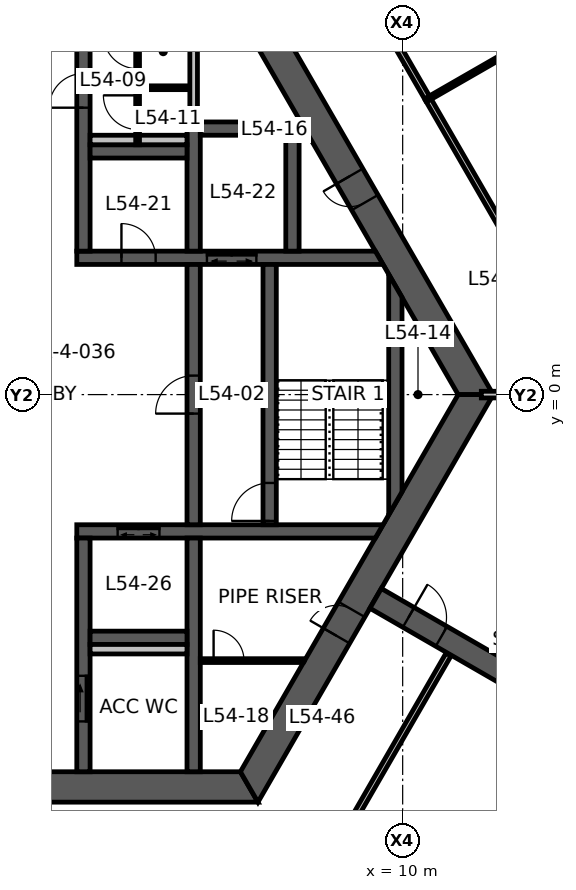
"""IFC4 building model, lengths in metres.
Left out: names, types, materials, properties, quantities, classifications, styles, units other than length and angle.
Written with IfcOpenShell. Run it as: python <this file> out.ifc"""

import sys

from ifc_helpers import new_model, si_unit, direction, frame, frame_2d, origin, place, context, subcontext, project, spatial, polyline, rectangle, outline, extrude, element, fill, save


model = new_model("IFC4")
c1 = context("Model", 3, precision=1e-05, world=origin(), true_north=direction((0.0, 1.0)))
c2 = subcontext(c1, "Body", "Model", "MODEL_VIEW")
j1 = project(units=[si_unit("LENGTHUNIT", "METRE"), si_unit("PLANEANGLEUNIT", "RADIAN")], contexts=[c1])
p1 = place(None, origin())
s1 = spatial("IfcSite", under=j1, at=p1, CompositionType="ELEMENT")
p2 = place(p1, origin())
s2 = spatial("IfcBuilding", under=s1, at=p2, CompositionType="ELEMENT")
p3 = place(p2, frame((0.0, 0.0, 216.7)))
s3 = spatial("IfcBuildingStorey", under=s2, at=p3, CompositionType="ELEMENT", Elevation=216.7)
p4 = place(p3, frame((11.922, 0.0, 0.0), z_axis=(0.0, 0.0, 1.0), x_axis=(-0.500004296715, 0.866022923061, 0.0)))
e1 = element("IfcWall", 1, at=p4, inside=s3, PredefinedType="SHEAR", context=c2, shape_type="SweptSolid", body=[
    extrude(outline(polyline([(-0.231, -0.4), (5.835, -0.4), (6.635, -0.4), (12.153, -0.4), (11.691, 0.4), (6.635, 0.4), (5.835, 0.4), (0.231, 0.4), (-0.231, -0.4)])), origin(), (0.0, 0.0, 1.0), 3.9),
])
p5 = place(p4, frame((5.835, 0.0, 0.0)))
e2 = element("IfcOpeningElement", 2, at=p5, cuts=e1, PredefinedType="OPENING", context=c2, shape_type="SweptSolid", body=[
    extrude(rectangle(XDim=0.8, YDim=2.1, at=frame_2d((0.4, 1.05))), frame((0.0, 0.41, 0.0), z_axis=(0.0, -1.0, 0.0), x_axis=(1.0, 0.0, 0.0)), (0.0, 0.0, 1.0), 0.82),
])
p6 = place(p3, frame((-5.961, -10.325, 0.0), z_axis=(0.0, 0.0, 1.0), x_axis=(1.0, 0.0, 0.0)))
e3 = element("IfcWall", 3, at=p6, inside=s3, PredefinedType="SHEAR", context=c2, shape_type="SweptSolid", body=[
    extrude(outline(polyline([(-0.231, -0.4), (5.461, -0.4), (6.461, -0.4), (12.153, -0.4), (11.691, 0.4), (6.461, 0.4), (5.461, 0.4), (0.231, 0.4), (-0.231, -0.4)])), origin(), (0.0, 0.0, 1.0), 3.9),
])
p7 = place(p6, frame((5.461, 0.0, 0.0)))
e4 = element("IfcOpeningElement", 4, at=p7, cuts=e3, PredefinedType="OPENING", context=c2, shape_type="SweptSolid", body=[
    extrude(rectangle(XDim=1.0, YDim=2.1, at=frame_2d((0.5, 1.05))), frame((0.0, 0.41, 0.0), z_axis=(0.0, -1.0, 0.0), x_axis=(1.0, 0.0, 0.0)), (0.0, 0.0, 1.0), 0.82),
])
p8 = place(p3, frame((5.961, -10.325, 0.0), z_axis=(0.0, 0.0, 1.0), x_axis=(0.500004296715, 0.866022923061, 0.0)))
e5 = element("IfcWall", 5, at=p8, inside=s3, PredefinedType="SHEAR", context=c2, shape_type="SweptSolid", body=[
    extrude(outline(polyline([(-0.231, -0.4), (4.594, -0.4), (5.394, -0.4), (12.153, -0.4), (11.691, 0.4), (5.394, 0.4), (4.594, 0.4), (0.231, 0.4), (-0.231, -0.4)])), origin(), (0.0, 0.0, 1.0), 3.9),
])
p9 = place(p8, frame((4.594, 0.0, 0.0)))
e6 = element("IfcOpeningElement", 6, at=p9, cuts=e5, PredefinedType="OPENING", context=c2, shape_type="SweptSolid", body=[
    extrude(rectangle(XDim=0.8, YDim=2.1, at=frame_2d((0.4, 1.05))), frame((0.0, 0.41, 0.0), z_axis=(0.0, -1.0, 0.0), x_axis=(1.0, 0.0, 0.0)), (0.0, 0.0, 1.0), 0.82),
])
p10 = place(p3, frame((9.288, -5.363, 0.0), z_axis=(0.0, 0.0, 1.0), x_axis=(0.866031736626, -0.499989031036, 0.0)))
e7 = element("IfcWall", 7, at=p10, inside=s3, PredefinedType="SHEAR", context=c2, shape_type="SweptSolid", body=[
    extrude(rectangle(XDim=7.796, YDim=0.6, at=frame_2d((3.898, 0.0))), origin(), (0.0, 0.0, 1.0), 3.9),
])
p11 = place(p10, frame((1.0, 0.0, 0.0)))
e8 = element("IfcOpeningElement", 8, at=p11, cuts=e7, PredefinedType="OPENING", context=c2, shape_type="SweptSolid", body=[
    extrude(rectangle(XDim=1.0, YDim=2.1, at=frame_2d((0.5, 1.05))), frame((0.0, 0.31, 0.0), z_axis=(0.0, -1.0, 0.0), x_axis=(1.0, 0.0, 0.0)), (0.0, 0.0, 1.0), 0.62),
])
p12 = place(p3, frame((1.425, 3.6, 0.0), z_axis=(0.0, 0.0, 1.0), x_axis=(1.0, 0.0, 0.0)))
e9 = element("IfcWall", 9, at=p12, inside=s3, PredefinedType="SHEAR", context=c2, shape_type="SweptSolid", body=[
    extrude(outline(polyline([(0.0, -0.175), (1.175, -0.175), (2.075, -0.175), (3.425, -0.175), (4.725, -0.175), (8.058, -0.175), (7.856, 0.175), (4.725, 0.175), (3.425, 0.175), (2.075, 0.175), (1.175, 0.175), (0.0, 0.175), (0.0, -0.175)])), origin(), (0.0, 0.0, 1.0), 3.9),
])
p13 = place(p12, frame((1.175, 0.0, 0.0)))
e10 = element("IfcOpeningElement", 10, at=p13, cuts=e9, PredefinedType="OPENING", context=c2, shape_type="SweptSolid", body=[
    extrude(rectangle(XDim=0.9, YDim=2.1, at=frame_2d((0.45, 1.05))), frame((0.0, 0.185, 0.0), z_axis=(0.0, -1.0, 0.0), x_axis=(1.0, 0.0, 0.0)), (0.0, 0.0, 1.0), 0.37),
])
p14 = place(p12, frame((3.425, 0.0, 0.0)))
e11 = element("IfcOpeningElement", 11, at=p14, cuts=e9, PredefinedType="OPENING", context=c2, shape_type="SweptSolid", body=[
    extrude(rectangle(XDim=1.3, YDim=2.1, at=frame_2d((0.65, 1.05))), frame((0.0, 0.185, 0.0), z_axis=(0.0, -1.0, 0.0), x_axis=(1.0, 0.0, 0.0)), (0.0, 0.0, 1.0), 0.37),
])
p15 = place(p3, frame((1.425, -3.6, 0.0), z_axis=(0.0, 0.0, 1.0), x_axis=(1.0, 0.0, 0.0)))
e12 = element("IfcWall", 12, at=p15, inside=s3, PredefinedType="SHEAR", context=c2, shape_type="SweptSolid", body=[
    extrude(outline(polyline([(0.0, -0.175), (1.075, -0.175), (2.175, -0.175), (7.856, -0.175), (8.058, 0.175), (2.175, 0.175), (1.075, 0.175), (0.0, 0.175), (0.0, -0.175)])), origin(), (0.0, 0.0, 1.0), 3.9),
])
p16 = place(p15, frame((1.075, 0.0, 0.0)))
e13 = element("IfcOpeningElement", 13, at=p16, cuts=e12, PredefinedType="OPENING", context=c2, shape_type="SweptSolid", body=[
    extrude(rectangle(XDim=1.1, YDim=2.1, at=frame_2d((0.55, 1.05))), frame((0.0, 0.185, 0.0), z_axis=(0.0, -1.0, 0.0), x_axis=(1.0, 0.0, 0.0)), (0.0, 0.0, 1.0), 0.37),
])
p17 = place(p3, frame((1.6, 3.775, 0.0), z_axis=(0.0, 0.0, 1.0), x_axis=(0.0, 1.0, 0.0)))
e14 = element("IfcWall", 14, at=p17, inside=s3, PredefinedType="SHEAR", context=c2, shape_type="SweptSolid", body=[
    extrude(rectangle(XDim=6.15, YDim=0.35, at=frame_2d((3.075, 0.0))), origin(), (0.0, 0.0, 1.0), 3.9),
])
p18 = place(p17, frame((3.775, 0.0, 0.0)))
e15 = element("IfcOpeningElement", 15, at=p18, cuts=e14, PredefinedType="OPENING", context=c2, shape_type="SweptSolid", body=[
    extrude(rectangle(XDim=0.9, YDim=2.1, at=frame_2d((0.45, 1.05))), frame((0.0, 0.185, 0.0), z_axis=(0.0, -1.0, 0.0), x_axis=(1.0, 0.0, 0.0)), (0.0, 0.0, 1.0), 0.37),
])
p19 = place(p3, frame((1.6, -3.775, 0.0), z_axis=(0.0, 0.0, 1.0), x_axis=(0.0, -1.0, 0.0)))
e16 = element("IfcWall", 16, at=p19, inside=s3, PredefinedType="SHEAR", context=c2, shape_type="SweptSolid", body=[
    extrude(rectangle(XDim=6.15, YDim=0.35, at=frame_2d((3.075, 0.0))), origin(), (0.0, 0.0, 1.0), 3.9),
])
p20 = place(p19, frame((3.625, 0.0, 0.0)))
e17 = element("IfcOpeningElement", 17, at=p20, cuts=e16, PredefinedType="OPENING", context=c2, shape_type="SweptSolid", body=[
    extrude(rectangle(XDim=1.2, YDim=2.1, at=frame_2d((0.6, 1.05))), frame((0.0, 0.185, 0.0), z_axis=(0.0, -1.0, 0.0), x_axis=(1.0, 0.0, 0.0)), (0.0, 0.0, 1.0), 0.37),
])
p21 = place(p3, frame((4.5, -3.425, 0.0), z_axis=(0.0, 0.0, 1.0), x_axis=(0.0, 1.0, 0.0)))
e18 = element("IfcWall", 18, at=p21, inside=s3, PredefinedType="SHEAR", context=c2, shape_type="SweptSolid", body=[
    extrude(rectangle(XDim=6.85, YDim=0.35, at=frame_2d((3.425, 0.0))), origin(), (0.0, 0.0, 1.0), 3.9),
])
p22 = place(p21, frame((2.925, 0.0, 0.0)))
e19 = element("IfcOpeningElement", 19, at=p22, cuts=e18, PredefinedType="OPENING", context=c2, shape_type="SweptSolid", body=[
    extrude(rectangle(XDim=1.0, YDim=2.1, at=frame_2d((0.5, 1.05))), frame((0.0, 0.185, 0.0), z_axis=(0.0, -1.0, 0.0), x_axis=(1.0, 0.0, 0.0)), (0.0, 0.0, 1.0), 0.37),
])
p23 = place(p3, frame((6.5, -3.425, 0.0), z_axis=(0.0, 0.0, 1.0), x_axis=(0.0, 1.0, 0.0)))
e20 = element("IfcWall", 20, at=p23, inside=s3, PredefinedType="SHEAR", context=c2, shape_type="SweptSolid", body=[
    extrude(rectangle(XDim=6.85, YDim=0.35, at=frame_2d((3.425, 0.0))), origin(), (0.0, 0.0, 1.0), 3.9),
])
p24 = place(p23, frame((0.1, 0.0, 0.0)))
e21 = element("IfcOpeningElement", 21, at=p24, cuts=e20, PredefinedType="OPENING", context=c2, shape_type="SweptSolid", body=[
    extrude(rectangle(XDim=1.0, YDim=2.1, at=frame_2d((0.5, 1.05))), frame((0.0, 0.185, 0.0), z_axis=(0.0, -1.0, 0.0), x_axis=(1.0, 0.0, 0.0)), (0.0, 0.0, 1.0), 0.37),
])
p25 = place(p3, frame((4.5, 3.775, 0.0), z_axis=(0.0, 0.0, 1.0), x_axis=(0.0, 1.0, 0.0)))
e22 = element("IfcWall", 22, at=p25, inside=s3, PredefinedType="SHEAR", context=c2, shape_type="SweptSolid", body=[
    extrude(rectangle(XDim=3.4, YDim=0.35, at=frame_2d((1.7, 0.0))), origin(), (0.0, 0.0, 1.0), 3.9),
])
p26 = place(p3, frame((4.5, -3.775, 0.0), z_axis=(0.0, 0.0, 1.0), x_axis=(0.0, -1.0, 0.0)))
e23 = element("IfcWall", 23, at=p26, inside=s3, PredefinedType="SHEAR", context=c2, shape_type="SweptSolid", body=[
    extrude(rectangle(XDim=6.15, YDim=0.35, at=frame_2d((3.075, 0.0))), origin(), (0.0, 0.0, 1.0), 3.9),
])
for number, where, z_axis, x_axis in (
    (24, (1.775, 6.4, 0.0), (0.0, 0.0, 1.0), (1.0, 0.0, 0.0)),
    (25, (1.775, -6.4, 0.0), (0.0, 0.0, 1.0), (1.0, 0.0, 0.0)),
):
    element("IfcWall", number, at=place(p3, frame(where, z_axis=z_axis, x_axis=x_axis)), inside=s3, PredefinedType="SHEAR", context=c2, shape_type="SweptSolid", body=[
        extrude(rectangle(XDim=2.55, YDim=0.35, at=frame_2d((1.275, 0.0))), origin(), (0.0, 0.0, 1.0), 3.9),
    ])
p27 = place(p3, frame((4.675, 7.0, 0.0), z_axis=(0.0, 0.0, 1.0), x_axis=(1.0, 0.0, 0.0)))
e26 = element("IfcWall", 26, at=p27, inside=s3, PredefinedType="SHEAR", context=c2, shape_type="SweptSolid", body=[
    extrude(rectangle(XDim=2.6, YDim=0.35, at=frame_2d((1.3, 0.0))), origin(), (0.0, 0.0, 1.0), 3.9),
])
p28 = place(p3, frame((7.1, 3.775, 0.0), z_axis=(0.0, 0.0, 1.0), x_axis=(0.0, 1.0, 0.0)))
e27 = element("IfcWall", 27, at=p28, inside=s3, PredefinedType="SHEAR", context=c2, shape_type="SweptSolid", body=[
    extrude(rectangle(XDim=3.05, YDim=0.35, at=frame_2d((1.525, 0.0))), origin(), (0.0, 0.0, 1.0), 3.9),
])
p29 = place(p3, frame((9.808, -2.862, 0.0), z_axis=(0.0, 0.0, 1.0), x_axis=(0.0, 1.0, 0.0)))
e28 = element("IfcWall", 28, at=p29, inside=s3, PredefinedType="SHEAR", context=c2, shape_type="SweptSolid", body=[
    extrude(outline(polyline([(0.303, -0.175), (5.421, -0.175), (6.028, 0.175), (-0.303, 0.175), (0.303, -0.175)])), origin(), (0.0, 0.0, 1.0), 3.9),
])
p30 = place(p3, frame((4.5, 7.175, 0.0), z_axis=(0.0, 0.0, 1.0), x_axis=(0.0, 1.0, 0.0)))
e29 = element("IfcWall", 29, at=p30, inside=s3, PredefinedType="STANDARD", context=c2, shape_type="SweptSolid", body=[
    extrude(rectangle(XDim=2.75, YDim=0.2, at=frame_2d((1.375, 0.0))), origin(), (0.0, 0.0, 1.0), 3.9),
])
for number, where, z_axis, x_axis in (
    (30, (1.775, 6.7, 0.0), (0.0, 0.0, 1.0), (1.0, 0.0, 0.0)),
    (31, (1.775, -6.7, 0.0), (0.0, 0.0, 1.0), (1.0, 0.0, 0.0)),
):
    element("IfcWall", number, at=place(p3, frame(where, z_axis=z_axis, x_axis=x_axis)), inside=s3, PredefinedType="PLUMBINGWALL", context=c2, shape_type="SweptSolid", body=[
        extrude(rectangle(XDim=2.55, YDim=0.25, at=frame_2d((1.275, 0.0))), origin(), (0.0, 0.0, 1.0), 3.9),
    ])
p31 = place(p3, frame((3.025, 6.575, 0.0), z_axis=(0.0, 0.0, 1.0), x_axis=(0.0, 1.0, 0.0)))
e32 = element("IfcWall", 32, at=p31, inside=s3, PredefinedType="PARTITIONING", context=c2, shape_type="SweptSolid", body=[
    extrude(rectangle(XDim=3.35, YDim=0.1, at=frame_2d((1.675, 0.0))), origin(), (0.0, 0.0, 1.0), 2.95),
])
p32 = place(p31, frame((2.0, 0.0, 0.0)))
e33 = element("IfcOpeningElement", 33, at=p32, cuts=e32, PredefinedType="OPENING", context=c2, shape_type="SweptSolid", body=[
    extrude(rectangle(XDim=0.9, YDim=2.1, at=frame_2d((0.45, 1.05))), frame((0.0, 0.06, 0.0), z_axis=(0.0, -1.0, 0.0), x_axis=(1.0, 0.0, 0.0)), (0.0, 0.0, 1.0), 0.12),
])
p33 = place(p31, frame((0.4, 0.0, 0.0)))
e34 = element("IfcOpeningElement", 34, at=p33, cuts=e32, PredefinedType="OPENING", context=c2, shape_type="SweptSolid", body=[
    extrude(rectangle(XDim=0.9, YDim=2.1, at=frame_2d((0.45, 1.05))), frame((0.0, 0.06, 0.0), z_axis=(0.0, -1.0, 0.0), x_axis=(1.0, 0.0, 0.0)), (0.0, 0.0, 1.0), 0.12),
])
p34 = place(p3, frame((3.075, 8.075, 0.0), z_axis=(0.0, 0.0, 1.0), x_axis=(1.0, 0.0, 0.0)))
e35 = element("IfcWall", 35, at=p34, inside=s3, PredefinedType="PARTITIONING", context=c2, shape_type="SweptSolid", body=[
    extrude(rectangle(XDim=1.25, YDim=0.1, at=frame_2d((0.625, 0.0))), origin(), (0.0, 0.0, 1.0), 2.95),
])
p35 = place(p3, frame((4.675, -7.0, 0.0), z_axis=(0.0, 0.0, 1.0), x_axis=(1.0, 0.0, 0.0)))
e36 = element("IfcWall", 36, at=p35, inside=s3, PredefinedType="PARTITIONING", context=c2, shape_type="SweptSolid", body=[
    extrude(outline(polyline([(0.0, -0.05), (0.35, -0.05), (1.15, -0.05), (2.715, -0.05), (2.744, 0.0), (2.75, 0.05), (1.15, 0.05), (0.35, 0.05), (0.0, 0.05), (0.0, -0.05)])), origin(), (0.0, 0.0, 1.0), 2.95),
])
p36 = place(p35, frame((0.35, 0.0, 0.0)))
e37 = element("IfcOpeningElement", 37, at=p36, cuts=e36, PredefinedType="OPENING", context=c2, shape_type="SweptSolid", body=[
    extrude(rectangle(XDim=0.8, YDim=2.1, at=frame_2d((0.4, 1.05))), frame((0.0, 0.06, 0.0), z_axis=(0.0, -1.0, 0.0), x_axis=(1.0, 0.0, 0.0)), (0.0, 0.0, 1.0), 0.12),
])
p37 = place(p3, frame((12.07, 0.0, 0.0), z_axis=(0.0, 0.0, 1.0), x_axis=(1.0, 0.0, 0.0)))
e38 = element("IfcWall", 38, at=p37, inside=s3, PredefinedType="PARTITIONING", context=c2, shape_type="SweptSolid", body=[
    extrude(rectangle(XDim=7.93, YDim=0.175, at=frame_2d((3.965, 0.0))), origin(), (0.0, 0.0, 1.0), 3.05),
])
p38 = place(p37, frame((1.13, 0.0, 0.0)))
e39 = element("IfcOpeningElement", 39, at=p38, cuts=e38, PredefinedType="OPENING", context=c2, shape_type="SweptSolid", body=[
    extrude(rectangle(XDim=1.0, YDim=2.1, at=frame_2d((0.5, 1.05))), frame((0.0, 0.098, 0.0), z_axis=(0.0, -1.0, 0.0), x_axis=(1.0, 0.0, 0.0)), (0.0, 0.0, 1.0), 0.195),
])
p39 = place(p3, frame((9.164, 10.377, 0.0), z_axis=(0.0, 0.0, 1.0), x_axis=(0.500038395149, -0.8660032352, 0.0)))
e40 = element("IfcWall", 40, at=p39, inside=s3, PredefinedType="PARTITIONING", context=c2, shape_type="SweptSolid", body=[
    extrude(rectangle(XDim=3.01, YDim=0.15, at=frame_2d((1.505, 0.0))), origin(), (0.0, 0.0, 1.0), 2.95),
])
p40 = place(p3, frame((10.664, 7.779, 0.0), z_axis=(0.0, 0.0, 1.0), x_axis=(0.49999608499, -0.866027664105, 0.0)))
e41 = element("IfcWall", 41, at=p40, inside=s3, PredefinedType="PARTITIONING", context=c2, shape_type="SweptSolid", body=[
    extrude(rectangle(XDim=8.959, YDim=0.15, at=frame_2d((4.479, 0.0))), origin(), (0.0, 0.0, 1.0), 2.95),
])
p41 = place(p40, frame((3.979, 0.0, 0.0)))
e42 = element("IfcOpeningElement", 42, at=p41, cuts=e41, PredefinedType="OPENING", context=c2, shape_type="SweptSolid", body=[
    extrude(rectangle(XDim=1.0, YDim=2.1, at=frame_2d((0.5, 1.05))), frame((0.0, 0.085, 0.0), z_axis=(0.0, -1.0, 0.0), x_axis=(1.0, 0.0, 0.0)), (0.0, 0.0, 1.0), 0.17),
])
p42 = place(p3, frame((13.092, 9.175, 0.0), z_axis=(0.0, 0.0, 1.0), x_axis=(-0.866855433567, -0.498559582492, 0.0)))
e43 = element("IfcWall", 43, at=p42, inside=s3, PredefinedType="PARTITIONING", context=c2, shape_type="SweptSolid", body=[
    extrude(rectangle(XDim=2.8, YDim=0.1, at=frame_2d((1.4, 0.0))), origin(), (0.0, 0.0, 1.0), 2.95),
])
p43 = place(p3, frame((11.207, -6.84, 0.0), z_axis=(0.0, 0.0, 1.0), x_axis=(-0.500002959843, -0.866023694911, 0.0)))
e44 = element("IfcWall", 44, at=p43, inside=s3, PredefinedType="PARTITIONING", context=c2, shape_type="SweptSolid", body=[
    extrude(rectangle(XDim=7.258, YDim=0.15, at=frame_2d((3.629, 0.0))), origin(), (0.0, 0.0, 1.0), 2.95),
])
p44 = place(p5, origin())
e45 = element("IfcDoor", 45, at=p44, inside=s3, OperationType="SINGLE_SWING_RIGHT", PredefinedType="DOOR", context=c2, shape_type="SweptSolid", body=[
    extrude(rectangle(XDim=0.8, YDim=2.1, at=frame_2d((0.4, 1.05))), frame((0.0, 0.025, 0.0), z_axis=(0.0, -1.0, 0.0), x_axis=(1.0, 0.0, 0.0)), (0.0, 0.0, 1.0), 0.05),
])
fill(e2, e45)
p45 = place(p9, origin())
e46 = element("IfcDoor", 46, at=p45, inside=s3, OperationType="SINGLE_SWING_LEFT", PredefinedType="DOOR", context=c2, shape_type="SweptSolid", body=[
    extrude(rectangle(XDim=0.8, YDim=2.1, at=frame_2d((0.4, 1.05))), frame((0.0, 0.025, 0.0), z_axis=(0.0, -1.0, 0.0), x_axis=(1.0, 0.0, 0.0)), (0.0, 0.0, 1.0), 0.05),
])
fill(e6, e46)
p46 = place(p22, origin())
e47 = element("IfcDoor", 47, at=p46, inside=s3, OperationType="SINGLE_SWING_LEFT", PredefinedType="DOOR", context=c2, shape_type="SweptSolid", body=[
    extrude(rectangle(XDim=1.0, YDim=2.1, at=frame_2d((0.5, 1.05))), frame((0.0, 0.025, 0.0), z_axis=(0.0, -1.0, 0.0), x_axis=(1.0, 0.0, 0.0)), (0.0, 0.0, 1.0), 0.05),
])
fill(e19, e47)
p47 = place(p24, origin())
e48 = element("IfcDoor", 48, at=p47, inside=s3, OperationType="SINGLE_SWING_LEFT", PredefinedType="DOOR", context=c2, shape_type="SweptSolid", body=[
    extrude(rectangle(XDim=1.0, YDim=2.1, at=frame_2d((0.5, 1.05))), frame((0.0, 0.025, 0.0), z_axis=(0.0, -1.0, 0.0), x_axis=(1.0, 0.0, 0.0)), (0.0, 0.0, 1.0), 0.05),
])
fill(e21, e48)
p48 = place(p18, origin())
e49 = element("IfcDoor", 49, at=p48, inside=s3, OperationType="SINGLE_SWING_LEFT", PredefinedType="DOOR", context=c2, shape_type="SweptSolid", body=[
    extrude(rectangle(XDim=0.9, YDim=2.1, at=frame_2d((0.45, 1.05))), frame((0.0, 0.025, 0.0), z_axis=(0.0, -1.0, 0.0), x_axis=(1.0, 0.0, 0.0)), (0.0, 0.0, 1.0), 0.05),
])
fill(e15, e49)
p49 = place(p20, origin())
e50 = element("IfcDoor", 50, at=p49, inside=s3, OperationType="SLIDING_TO_LEFT", PredefinedType="DOOR", context=c2, shape_type="SweptSolid", body=[
    extrude(rectangle(XDim=1.2, YDim=2.1, at=frame_2d((0.6, 1.05))), frame((0.0, 0.025, 0.0), z_axis=(0.0, -1.0, 0.0), x_axis=(1.0, 0.0, 0.0)), (0.0, 0.0, 1.0), 0.05),
])
fill(e17, e50)
p50 = place(p13, origin())
e51 = element("IfcDoor", 51, at=p50, inside=s3, OperationType="SINGLE_SWING_LEFT", PredefinedType="DOOR", context=c2, shape_type="SweptSolid", body=[
    extrude(rectangle(XDim=0.9, YDim=2.1, at=frame_2d((0.45, 1.05))), frame((0.0, 0.025, 0.0), z_axis=(0.0, -1.0, 0.0), x_axis=(1.0, 0.0, 0.0)), (0.0, 0.0, 1.0), 0.05),
])
fill(e10, e51)
p51 = place(p11, origin())
e52 = element("IfcDoor", 52, at=p51, inside=s3, OperationType="SINGLE_SWING_LEFT", PredefinedType="DOOR", context=c2, shape_type="SweptSolid", body=[
    extrude(rectangle(XDim=1.0, YDim=2.1, at=frame_2d((0.5, 1.05))), frame((0.0, 0.025, 0.0), z_axis=(0.0, -1.0, 0.0), x_axis=(1.0, 0.0, 0.0)), (0.0, 0.0, 1.0), 0.05),
])
fill(e8, e52)
p52 = place(p32, origin())
e53 = element("IfcDoor", 53, at=p52, inside=s3, OperationType="SINGLE_SWING_RIGHT", PredefinedType="DOOR", context=c2, shape_type="SweptSolid", body=[
    extrude(rectangle(XDim=0.9, YDim=2.1, at=frame_2d((0.45, 1.05))), frame((0.0, 0.025, 0.0), z_axis=(0.0, -1.0, 0.0), x_axis=(1.0, 0.0, 0.0)), (0.0, 0.0, 1.0), 0.05),
])
fill(e33, e53)
p53 = place(p33, origin())
e54 = element("IfcDoor", 54, at=p53, inside=s3, OperationType="SINGLE_SWING_RIGHT", PredefinedType="DOOR", context=c2, shape_type="SweptSolid", body=[
    extrude(rectangle(XDim=0.9, YDim=2.1, at=frame_2d((0.45, 1.05))), frame((0.0, 0.025, 0.0), z_axis=(0.0, -1.0, 0.0), x_axis=(1.0, 0.0, 0.0)), (0.0, 0.0, 1.0), 0.05),
])
fill(e34, e54)
p54 = place(p36, origin())
e55 = element("IfcDoor", 55, at=p54, inside=s3, OperationType="SINGLE_SWING_LEFT", PredefinedType="DOOR", context=c2, shape_type="SweptSolid", body=[
    extrude(rectangle(XDim=0.8, YDim=2.1, at=frame_2d((0.4, 1.05))), frame((0.0, 0.025, 0.0), z_axis=(0.0, -1.0, 0.0), x_axis=(1.0, 0.0, 0.0)), (0.0, 0.0, 1.0), 0.05),
])
fill(e37, e55)
p55 = place(p16, origin())
e56 = element("IfcDoor", 56, at=p55, inside=s3, OperationType="DOUBLE_DOOR_SLIDING", PredefinedType="DOOR", context=c2, shape_type="SweptSolid", body=[
    extrude(rectangle(XDim=1.1, YDim=2.1, at=frame_2d((0.55, 1.05))), frame((0.0, 0.025, 0.0), z_axis=(0.0, -1.0, 0.0), x_axis=(1.0, 0.0, 0.0)), (0.0, 0.0, 1.0), 0.05),
])
fill(e13, e56)
p56 = place(p14, origin())
e57 = element("IfcDoor", 57, at=p56, inside=s3, OperationType="DOUBLE_DOOR_SLIDING", PredefinedType="DOOR", context=c2, shape_type="SweptSolid", body=[
    extrude(rectangle(XDim=1.3, YDim=2.1, at=frame_2d((0.65, 1.05))), frame((0.0, 0.025, 0.0), z_axis=(0.0, -1.0, 0.0), x_axis=(1.0, 0.0, 0.0)), (0.0, 0.0, 1.0), 0.05),
])
fill(e11, e57)
save(model, sys.argv[1])
